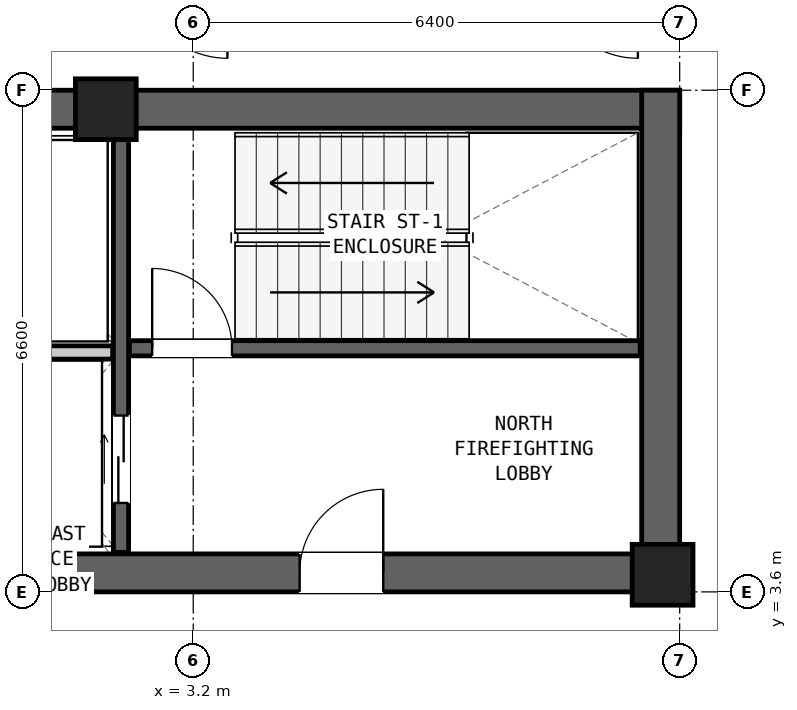
"""IFC4 building model, lengths in metres.
Left out: names, types, materials, properties, quantities, classifications, styles, units other than length and angle.
Written with IfcOpenShell. Run it as: python <this file> out.ifc"""

import sys

from ifc_helpers import new_model, si_unit, direction, frame, frame_2d, origin, origin_2d, place, context, subcontext, project, spatial, rectangle, extrude, element, fill, save


model = new_model("IFC4")
c1 = context("Model", 3, precision=1e-05, world=origin(), true_north=direction((0.0, 1.0)))
c2 = subcontext(c1, "Body", "Model", "MODEL_VIEW")
j1 = project(units=[si_unit("LENGTHUNIT", "METRE"), si_unit("PLANEANGLEUNIT", "RADIAN")], contexts=[c1])
p1 = place(None, origin())
s1 = spatial("IfcSite", under=j1, at=p1, CompositionType="ELEMENT")
p2 = place(p1, origin())
s2 = spatial("IfcBuilding", under=s1, at=p2, CompositionType="ELEMENT")
p3 = place(p2, frame((0.0, 0.0, 195.15)))
s3 = spatial("IfcBuildingStorey", under=s2, at=p3, CompositionType="ELEMENT", Elevation=195.15)
p4 = place(p3, frame((-9.6, 9.95, 0.0), z_axis=(0.0, 0.0, 1.0), x_axis=(1.0, 0.0, 0.0)))
e1 = element("IfcWall", 1, at=p4, inside=s3, PredefinedType="SHEAR", context=c2, shape_type="SweptSolid", body=[
    extrude(rectangle(XDim=19.2, YDim=0.5, at=frame_2d((9.6, 0.0))), origin(), (0.0, 0.0, 1.0), 4.35),
])
p5 = place(p3, frame((-9.6, 3.85, 0.0), z_axis=(0.0, 0.0, 1.0), x_axis=(1.0, 0.0, 0.0)))
e2 = element("IfcWall", 2, at=p5, inside=s3, PredefinedType="SHEAR", context=c2, shape_type="SweptSolid", body=[
    extrude(rectangle(XDim=19.2, YDim=0.5, at=frame_2d((9.6, 0.0))), origin(), (0.0, 0.0, 1.0), 4.35),
])
p6 = place(p5, frame((14.2, 0.0, 0.0)))
e3 = element("IfcOpeningElement", 3, at=p6, cuts=e2, PredefinedType="OPENING", context=c2, shape_type="SweptSolid", body=[
    extrude(rectangle(XDim=1.1, YDim=2.08, at=frame_2d((0.55, 1.04))), frame((0.0, 0.262, 0.0), z_axis=(0.0, -1.0, 0.0), x_axis=(1.0, 0.0, 0.0)), (0.0, 0.0, 1.0), 0.524),
])
p7 = place(p5, frame((8.2, 0.0, 0.0)))
e4 = element("IfcOpeningElement", 4, at=p7, cuts=e2, PredefinedType="OPENING", context=c2, shape_type="SweptSolid", body=[
    extrude(rectangle(XDim=1.15, YDim=2.1, at=frame_2d((0.575, 1.05))), frame((0.0, 0.262, 0.0), z_axis=(0.0, -1.0, 0.0), x_axis=(1.0, 0.0, 0.0)), (0.0, 0.0, 1.0), 0.524),
])
p8 = place(p5, frame((2.5, 0.0, 0.0)))
e5 = element("IfcOpeningElement", 5, at=p8, cuts=e2, PredefinedType="OPENING", context=c2, shape_type="SweptSolid", body=[
    extrude(rectangle(XDim=1.6, YDim=2.12, at=frame_2d((0.8, 1.06))), frame((0.0, 0.262, 0.0), z_axis=(0.0, -1.0, 0.0), x_axis=(1.0, 0.0, 0.0)), (0.0, 0.0, 1.0), 0.524),
])
p9 = place(p3, frame((9.35, 3.6, 0.0), z_axis=(0.0, 0.0, 1.0), x_axis=(0.0, 1.0, 0.0)))
e6 = element("IfcWall", 6, at=p9, inside=s3, PredefinedType="SHEAR", context=c2, shape_type="SweptSolid", body=[
    extrude(rectangle(XDim=6.6, YDim=0.5, at=frame_2d((3.3, 0.0))), origin(), (0.0, 0.0, 1.0), 4.35),
])
for number, where, z_axis, x_axis in (
    (7, (2.05, 9.95, 0.0), (0.0, 0.0, 1.0), (1.0, 0.0, 0.0)),
    (8, (9.375, 3.825, 0.0), (0.0, 0.0, 1.0), (1.0, 0.0, 0.0)),
):
    element("IfcColumn", number, at=place(p3, frame(where, z_axis=z_axis, x_axis=x_axis)), inside=s3, PredefinedType="COLUMN", context=c2, shape_type="SweptSolid", body=[
        extrude(rectangle(XDim=0.8, YDim=0.8, at=origin_2d()), origin(), (0.0, 0.0, 1.0), 4.35),
    ])
p10 = place(p3, frame((2.36, 6.805, 0.0), z_axis=(0.0, 0.0, 1.0), x_axis=(1.0, 0.0, 0.0)))
e9 = element("IfcWall", 9, at=p10, inside=s3, PredefinedType="SHEAR", context=c2, shape_type="SweptSolid", body=[
    extrude(rectangle(XDim=6.72, YDim=0.2, at=frame_2d((3.36, 0.0))), origin(), (0.0, 0.0, 1.0), 4.16),
])
p11 = place(p10, frame((0.3, 0.0, 0.0)))
e10 = element("IfcOpeningElement", 10, at=p11, cuts=e9, PredefinedType="OPENING", context=c2, shape_type="SweptSolid", body=[
    extrude(rectangle(XDim=1.05, YDim=2.08, at=frame_2d((0.525, 1.04))), frame((0.0, 0.112, 0.0), z_axis=(0.0, -1.0, 0.0), x_axis=(1.0, 0.0, 0.0)), (0.0, 0.0, 1.0), 0.224),
])
p12 = place(p3, frame((2.25, 4.12, 0.0), z_axis=(0.0, 0.0, 1.0), x_axis=(0.0, 1.0, 0.0)))
e11 = element("IfcWall", 11, at=p12, inside=s3, PredefinedType="SHEAR", context=c2, shape_type="SweptSolid", body=[
    extrude(rectangle(XDim=5.56, YDim=0.2, at=frame_2d((2.78, 0.0))), origin(), (0.0, 0.0, 1.0), 4.16),
])
p13 = place(p12, frame((0.65, 0.0, 0.0)))
e12 = element("IfcOpeningElement", 12, at=p13, cuts=e11, PredefinedType="OPENING", context=c2, shape_type="SweptSolid", body=[
    extrude(rectangle(XDim=1.15, YDim=2.08, at=frame_2d((0.575, 1.04))), frame((0.0, 0.112, 0.0), z_axis=(0.0, -1.0, 0.0), x_axis=(1.0, 0.0, 0.0)), (0.0, 0.0, 1.0), 0.224),
])
p14 = place(p3, frame((0.16, 6.75, 0.0), z_axis=(0.0, 0.0, 1.0), x_axis=(1.0, 0.0, 0.0)))
e13 = element("IfcWall", 13, at=p14, inside=s3, PredefinedType="PARTITIONING", context=c2, shape_type="SweptSolid", body=[
    extrude(rectangle(XDim=1.98, YDim=0.175, at=frame_2d((0.99, 0.0))), origin(), (0.0, 0.0, 1.0), 4.16),
])
p15 = place(p11, origin())
e14 = element("IfcDoor", 14, at=p15, inside=s3, OperationType="SINGLE_SWING_LEFT", PredefinedType="DOOR", context=c2, shape_type="SweptSolid", body=[
    extrude(rectangle(XDim=1.05, YDim=2.08, at=frame_2d((0.525, 1.04))), frame((0.0, 0.025, 0.0), z_axis=(0.0, -1.0, 0.0), x_axis=(1.0, 0.0, 0.0)), (0.0, 0.0, 1.0), 0.05),
])
fill(e10, e14)
p16 = place(p6, origin())
e15 = element("IfcDoor", 15, at=p16, inside=s3, OperationType="SINGLE_SWING_RIGHT", PredefinedType="DOOR", context=c2, shape_type="SweptSolid", body=[
    extrude(rectangle(XDim=1.1, YDim=2.08, at=frame_2d((0.55, 1.04))), frame((0.0, 0.025, 0.0), z_axis=(0.0, -1.0, 0.0), x_axis=(1.0, 0.0, 0.0)), (0.0, 0.0, 1.0), 0.05),
])
fill(e3, e15)
p17 = place(p13, origin())
e16 = element("IfcDoor", 16, at=p17, inside=s3, OperationType="DOUBLE_DOOR_SLIDING", PredefinedType="DOOR", context=c2, shape_type="SweptSolid", body=[
    extrude(rectangle(XDim=1.15, YDim=2.08, at=frame_2d((0.575, 1.04))), frame((0.0, 0.025, 0.0), z_axis=(0.0, -1.0, 0.0), x_axis=(1.0, 0.0, 0.0)), (0.0, 0.0, 1.0), 0.05),
])
fill(e12, e16)
save(model, sys.argv[1])
